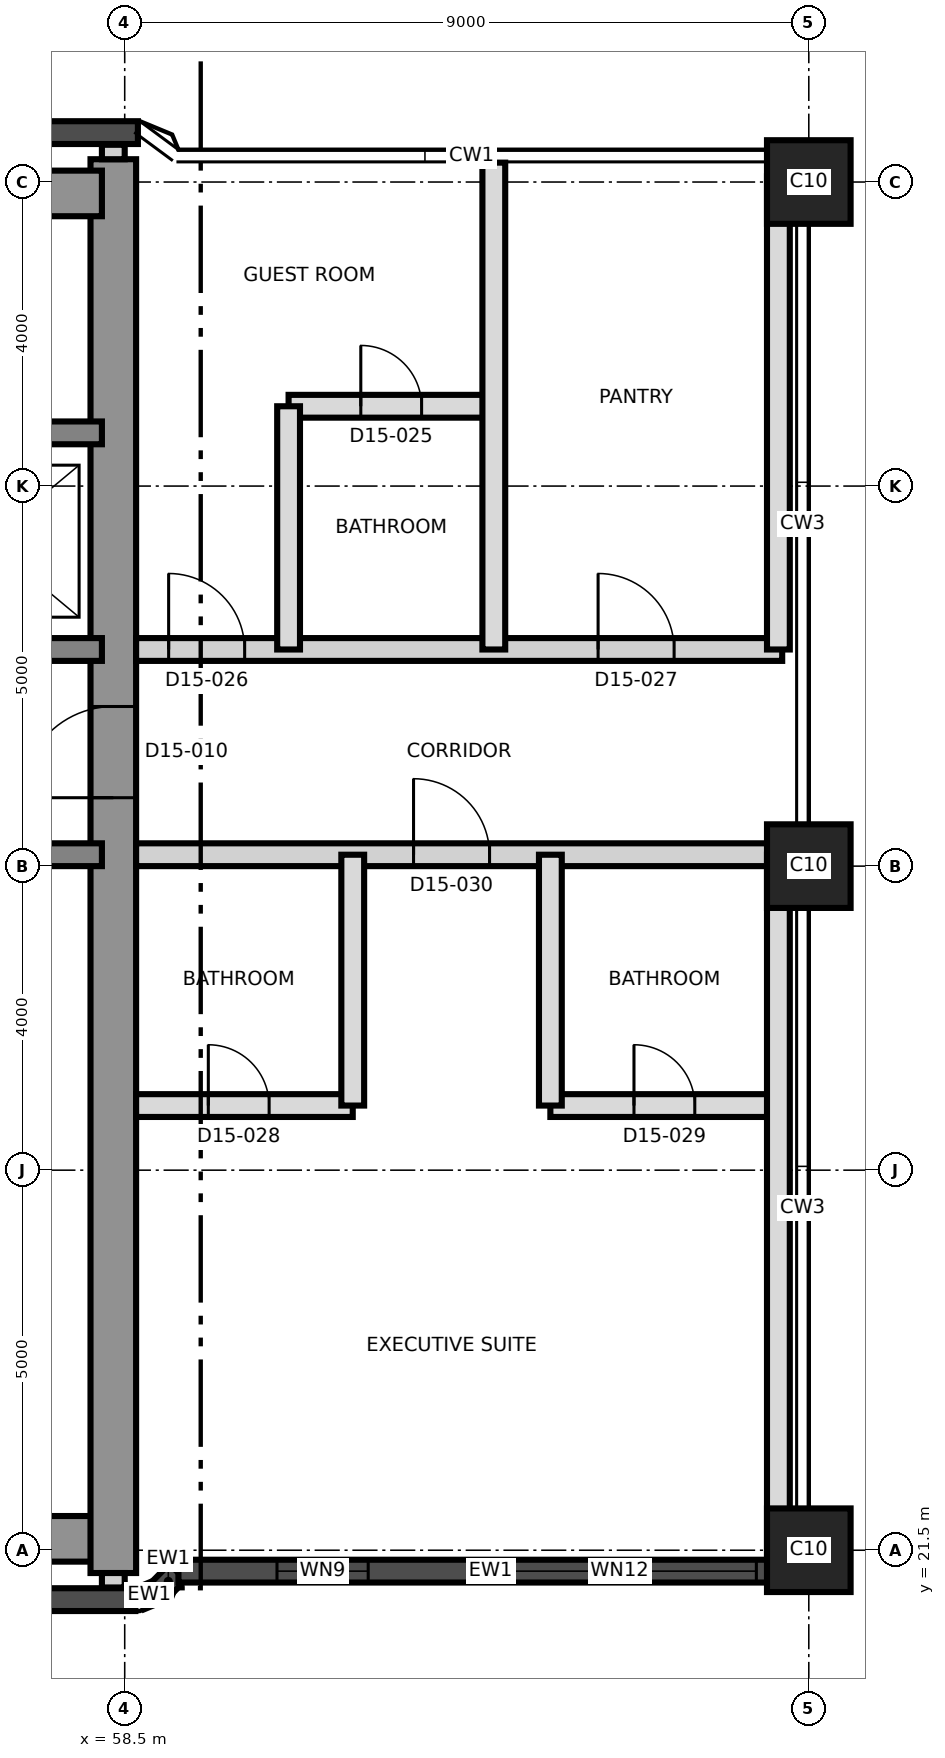
"""IFC4 building model, lengths in metres.
Left out: names, types, materials, properties, quantities, classifications, styles, units other than length and angle.
Written with IfcOpenShell. Run it as: python <this file> out.ifc"""

import sys

from ifc_helpers import new_model, si_unit, direction, frame, frame_2d, origin, origin_2d, place, context, subcontext, project, spatial, rectangle, extrude, element, fill, save


model = new_model("IFC4")
c1 = context("Model", 3, precision=1e-05, world=origin(), true_north=direction((0.0, 1.0)))
c2 = subcontext(c1, "Body", "Model", "MODEL_VIEW")
j1 = project(units=[si_unit("LENGTHUNIT", "METRE"), si_unit("PLANEANGLEUNIT", "RADIAN")], contexts=[c1])
p1 = place(None, origin())
s1 = spatial("IfcSite", under=j1, at=p1, CompositionType="ELEMENT")
p2 = place(p1, origin())
s2 = spatial("IfcBuilding", under=s1, at=p2, CompositionType="ELEMENT")
p3 = place(p2, frame((0.0, 0.0, 153.3)))
s3 = spatial("IfcBuildingStorey", under=s2, at=p3, CompositionType="ELEMENT", Elevation=153.3)
p4 = place(p3, frame((31.2, 21.65, 0.0), z_axis=(0.0, 0.0, 1.0), x_axis=(1.0, 0.0, 0.0)))
e1 = element("IfcWall", 1, at=p4, inside=s3, PredefinedType="SHEAR", context=c2, shape_type="SweptSolid", body=[
    extrude(rectangle(XDim=27.0, YDim=0.6, at=frame_2d((13.5, 0.0))), origin(), (0.0, 0.0, 1.0), 3.7),
])
p5 = place(p3, frame((58.35, 21.2, 0.0), z_axis=(0.0, 0.0, 1.0), x_axis=(0.0, 1.0, 0.0)))
e2 = element("IfcWall", 2, at=p5, inside=s3, PredefinedType="SHEAR", context=c2, shape_type="SweptSolid", body=[
    extrude(rectangle(XDim=18.6, YDim=0.6, at=frame_2d((9.3, 0.0))), origin(), (0.0, 0.0, 1.0), 3.7),
])
p6 = place(p5, frame((10.2, 0.0, 0.0)))
e3 = element("IfcOpeningElement", 3, at=p6, cuts=e2, PredefinedType="OPENING", context=c2, shape_type="SweptSolid", body=[
    extrude(rectangle(XDim=1.2, YDim=2.1, at=frame_2d((0.6, 1.05))), frame((0.0, 0.31, 0.0), z_axis=(0.0, -1.0, 0.0), x_axis=(1.0, 0.0, 0.0)), (0.0, 0.0, 1.0), 0.62),
])
p7 = place(p3, frame((31.2, 39.35, 0.0), z_axis=(0.0, 0.0, 1.0), x_axis=(1.0, 0.0, 0.0)))
e4 = element("IfcWall", 4, at=p7, inside=s3, PredefinedType="SHEAR", context=c2, shape_type="SweptSolid", body=[
    extrude(rectangle(XDim=27.0, YDim=0.6, at=frame_2d((13.5, 0.0))), origin(), (0.0, 0.0, 1.0), 3.7),
])
p8 = place(p7, frame((10.5, 0.0, 0.0)))
e5 = element("IfcOpeningElement", 5, at=p8, cuts=e4, PredefinedType="OPENING", context=c2, shape_type="SweptSolid", body=[
    extrude(rectangle(XDim=1.2, YDim=2.1, at=frame_2d((0.6, 1.05))), frame((0.0, 0.31, 0.0), z_axis=(0.0, -1.0, 0.0), x_axis=(1.0, 0.0, 0.0)), (0.0, 0.0, 1.0), 0.62),
])
p9 = place(p3, frame((31.8, 30.65, 0.0), z_axis=(0.0, 0.0, 1.0), x_axis=(1.0, 0.0, 0.0)))
e6 = element("IfcWall", 6, at=p9, inside=s3, PredefinedType="SHEAR", context=c2, shape_type="SweptSolid", body=[
    extrude(rectangle(XDim=26.4, YDim=0.3, at=frame_2d((13.2, 0.0))), origin(), (0.0, 0.0, 1.0), 3.7),
])
p10 = place(p9, frame((24.7, 0.0, 0.0)))
e7 = element("IfcOpeningElement", 7, at=p10, cuts=e6, PredefinedType="OPENING", context=c2, shape_type="SweptSolid", body=[
    extrude(rectangle(XDim=1.0, YDim=2.1, at=frame_2d((0.5, 1.05))), frame((0.0, 0.16, 0.0), z_axis=(0.0, -1.0, 0.0), x_axis=(1.0, 0.0, 0.0)), (0.0, 0.0, 1.0), 0.32),
])
p11 = place(p3, frame((31.8, 33.35, 0.0), z_axis=(0.0, 0.0, 1.0), x_axis=(1.0, 0.0, 0.0)))
e8 = element("IfcWall", 8, at=p11, inside=s3, PredefinedType="SHEAR", context=c2, shape_type="SweptSolid", body=[
    extrude(rectangle(XDim=26.4, YDim=0.3, at=frame_2d((13.2, 0.0))), origin(), (0.0, 0.0, 1.0), 3.7),
])
p12 = place(p11, frame((13.85, 0.0, 0.0)))
e9 = element("IfcOpeningElement", 9, at=p12, cuts=e8, PredefinedType="OPENING", context=c2, shape_type="SweptSolid", body=[
    extrude(rectangle(XDim=1.4, YDim=2.1, at=frame_2d((0.7, 1.05))), frame((0.0, 0.16, 0.0), z_axis=(0.0, -1.0, 0.0), x_axis=(1.0, 0.0, 0.0)), (0.0, 0.0, 1.0), 0.32),
])
p13 = place(p11, frame((5.325, 0.0, 0.0)))
e10 = element("IfcOpeningElement", 10, at=p13, cuts=e8, PredefinedType="OPENING", context=c2, shape_type="SweptSolid", body=[
    extrude(rectangle(XDim=1.2, YDim=2.1, at=frame_2d((0.6, 1.05))), frame((0.0, 0.16, 0.0), z_axis=(0.0, -1.0, 0.0), x_axis=(1.0, 0.0, 0.0)), (0.0, 0.0, 1.0), 0.32),
])
p14 = place(p11, frame((19.875, 0.0, 0.0)))
e11 = element("IfcOpeningElement", 11, at=p14, cuts=e8, PredefinedType="OPENING", context=c2, shape_type="SweptSolid", body=[
    extrude(rectangle(XDim=1.2, YDim=2.1, at=frame_2d((0.6, 1.05))), frame((0.0, 0.16, 0.0), z_axis=(0.0, -1.0, 0.0), x_axis=(1.0, 0.0, 0.0)), (0.0, 0.0, 1.0), 0.32),
])
p15 = place(p3, frame((43.5, 36.2, 0.0), z_axis=(0.0, 0.0, 1.0), x_axis=(1.0, 0.0, 0.0)))
e12 = element("IfcWall", 12, at=p15, inside=s3, PredefinedType="SHEAR", context=c2, shape_type="SweptSolid", body=[
    extrude(rectangle(XDim=14.7, YDim=0.3, at=frame_2d((7.35, 0.0))), origin(), (0.0, 0.0, 1.0), 3.7),
])
p16 = place(p15, frame((6.9, 0.0, 0.0)))
e13 = element("IfcOpeningElement", 13, at=p16, cuts=e12, PredefinedType="OPENING", context=c2, shape_type="SweptSolid", body=[
    extrude(rectangle(XDim=1.2, YDim=2.1, at=frame_2d((0.6, 1.05))), frame((0.0, 0.16, 0.0), z_axis=(0.0, -1.0, 0.0), x_axis=(1.0, 0.0, 0.0)), (0.0, 0.0, 1.0), 0.32),
])
p17 = place(p15, frame((0.7, 0.0, 0.0)))
e14 = element("IfcOpeningElement", 14, at=p17, cuts=e12, PredefinedType="OPENING", context=c2, shape_type="SweptSolid", body=[
    extrude(rectangle(XDim=1.3, YDim=2.4, at=frame_2d((0.65, 1.2))), frame((0.0, 0.16, 0.0), z_axis=(0.0, -1.0, 0.0), x_axis=(1.0, 0.0, 0.0)), (0.0, 0.0, 1.0), 0.32),
])
p18 = place(p15, frame((3.7, 0.0, 0.0)))
e15 = element("IfcOpeningElement", 15, at=p18, cuts=e12, PredefinedType="OPENING", context=c2, shape_type="SweptSolid", body=[
    extrude(rectangle(XDim=1.3, YDim=2.4, at=frame_2d((0.65, 1.2))), frame((0.0, 0.16, 0.0), z_axis=(0.0, -1.0, 0.0), x_axis=(1.0, 0.0, 0.0)), (0.0, 0.0, 1.0), 0.32),
])
for number, where, z_axis, x_axis in (
    (16, (67.5, 21.5, 0.0), (0.0, 0.0, 1.0), (1.0, 0.0, 0.0)),
    (17, (67.5, 30.5, 0.0), (0.0, 0.0, 1.0), (1.0, 0.0, 0.0)),
    (18, (67.5, 39.5, 0.0), (0.0, 0.0, 1.0), (1.0, 0.0, 0.0)),
):
    element("IfcColumn", number, at=place(p3, frame(where, z_axis=z_axis, x_axis=x_axis)), inside=s3, PredefinedType="COLUMN", context=c2, shape_type="SweptSolid", body=[
        extrude(rectangle(XDim=1.1, YDim=1.1, at=origin_2d()), origin(), (0.0, 0.0, 1.0), 3.7),
    ])
p19 = place(p3, frame((58.674, 40.15, 0.0), z_axis=(0.0, 0.0, 1.0), x_axis=(-1.0, 0.0, 0.0)))
e19 = element("IfcWall", 19, at=p19, inside=s3, PredefinedType="SOLIDWALL", context=c2, shape_type="SweptSolid", body=[
    extrude(rectangle(XDim=5.116, YDim=0.3, at=frame_2d((2.558, 0.0))), origin(), (0.0, 0.0, 1.0), 3.4),
])
p20 = place(p3, frame((31.36, 20.85, 0.0), z_axis=(0.0, 0.0, 1.0), x_axis=(1.0, 0.0, 0.0)))
e20 = element("IfcWall", 20, at=p20, inside=s3, PredefinedType="SOLIDWALL", context=c2, shape_type="SweptSolid", body=[
    extrude(rectangle(XDim=27.281, YDim=0.3, at=frame_2d((13.64, 0.0))), origin(), (0.0, 0.0, 1.0), 3.4),
])
p21 = place(p3, frame((58.698, 20.861, 0.0), z_axis=(0.0, 0.0, 1.0), x_axis=(0.923757413239, 0.38297812142, 0.0)))
e21 = element("IfcWall", 21, at=p21, inside=s3, PredefinedType="SOLIDWALL", context=c2, shape_type="SweptSolid", body=[
    extrude(rectangle(XDim=0.275, YDim=0.3, at=frame_2d((0.138, 0.0))), origin(), (0.0, 0.0, 1.0), 3.4),
])
p22 = place(p3, frame((58.952, 20.967, 0.0), z_axis=(0.0, 0.0, 1.0), x_axis=(0.702144810536, 0.712034174065, 0.0)))
e22 = element("IfcWall", 22, at=p22, inside=s3, PredefinedType="SOLIDWALL", context=c2, shape_type="SweptSolid", body=[
    extrude(rectangle(XDim=0.346, YDim=0.3, at=frame_2d((0.173, 0.0))), origin(), (0.0, 0.0, 1.0), 3.4),
])
p23 = place(p3, frame((59.207, 21.225, 0.0), z_axis=(0.0, 0.0, 1.0), x_axis=(1.0, 0.0, 0.0)))
e23 = element("IfcWall", 23, at=p23, inside=s3, PredefinedType="SOLIDWALL", context=c2, shape_type="SweptSolid", body=[
    extrude(rectangle(XDim=8.213, YDim=0.3, at=frame_2d((4.106, 0.0))), origin(), (0.0, 0.0, 1.0), 3.4),
])
p24 = place(p23, frame((1.297, 0.0, 0.9)))
e24 = element("IfcOpeningElement", 24, at=p24, cuts=e23, PredefinedType="OPENING", context=c2, shape_type="SweptSolid", body=[
    extrude(rectangle(XDim=1.2, YDim=1.5, at=frame_2d((0.6, 0.75))), frame((0.0, 0.16, 0.0), z_axis=(0.0, -1.0, 0.0), x_axis=(1.0, 0.0, 0.0)), (0.0, 0.0, 1.0), 0.32),
])
p25 = place(p23, frame((4.003, 0.0, 0.9)))
e25 = element("IfcOpeningElement", 25, at=p25, cuts=e23, PredefinedType="OPENING", context=c2, shape_type="SweptSolid", body=[
    extrude(rectangle(XDim=3.6, YDim=1.5, at=frame_2d((1.8, 0.75))), frame((0.0, 0.16, 0.0), z_axis=(0.0, -1.0, 0.0), x_axis=(1.0, 0.0, 0.0)), (0.0, 0.0, 1.0), 0.32),
])
p26 = place(p3, frame((58.65, 27.35, 0.0), z_axis=(0.0, 0.0, 1.0), x_axis=(1.0, 0.0, 0.0)))
e26 = element("IfcWall", 26, at=p26, inside=s3, PredefinedType="PARTITIONING", context=c2, shape_type="SweptSolid", body=[
    extrude(rectangle(XDim=2.85, YDim=0.3, at=frame_2d((1.425, 0.0))), origin(), (0.0, 0.0, 1.0), 3.4),
])
p27 = place(p26, frame((0.95, 0.0, 0.0)))
e27 = element("IfcOpeningElement", 27, at=p27, cuts=e26, PredefinedType="OPENING", context=c2, shape_type="SweptSolid", body=[
    extrude(rectangle(XDim=0.8, YDim=2.1, at=frame_2d((0.4, 1.05))), frame((0.0, 0.16, 0.0), z_axis=(0.0, -1.0, 0.0), x_axis=(1.0, 0.0, 0.0)), (0.0, 0.0, 1.0), 0.32),
])
p28 = place(p3, frame((64.1, 27.35, 0.0), z_axis=(0.0, 0.0, 1.0), x_axis=(1.0, 0.0, 0.0)))
e28 = element("IfcWall", 28, at=p28, inside=s3, PredefinedType="PARTITIONING", context=c2, shape_type="SweptSolid", body=[
    extrude(rectangle(XDim=3.0, YDim=0.3, at=frame_2d((1.5, 0.0))), origin(), (0.0, 0.0, 1.0), 3.4),
])
p29 = place(p28, frame((1.1, 0.0, 0.0)))
e29 = element("IfcOpeningElement", 29, at=p29, cuts=e28, PredefinedType="OPENING", context=c2, shape_type="SweptSolid", body=[
    extrude(rectangle(XDim=0.8, YDim=2.1, at=frame_2d((0.4, 1.05))), frame((0.0, 0.16, 0.0), z_axis=(0.0, -1.0, 0.0), x_axis=(1.0, 0.0, 0.0)), (0.0, 0.0, 1.0), 0.32),
])
p30 = place(p3, frame((58.65, 30.65, 0.0), z_axis=(0.0, 0.0, 1.0), x_axis=(1.0, 0.0, 0.0)))
e30 = element("IfcWall", 30, at=p30, inside=s3, PredefinedType="PARTITIONING", context=c2, shape_type="SweptSolid", body=[
    extrude(rectangle(XDim=8.5, YDim=0.3, at=frame_2d((4.25, 0.0))), origin(), (0.0, 0.0, 1.0), 3.4),
])
p31 = place(p30, frame((3.65, 0.0, 0.0)))
e31 = element("IfcOpeningElement", 31, at=p31, cuts=e30, PredefinedType="OPENING", context=c2, shape_type="SweptSolid", body=[
    extrude(rectangle(XDim=1.0, YDim=2.4, at=frame_2d((0.5, 1.2))), frame((0.0, 0.16, 0.0), z_axis=(0.0, -1.0, 0.0), x_axis=(1.0, 0.0, 0.0)), (0.0, 0.0, 1.0), 0.32),
])
p32 = place(p3, frame((58.65, 33.35, 0.0), z_axis=(0.0, 0.0, 1.0), x_axis=(1.0, 0.0, 0.0)))
e32 = element("IfcWall", 32, at=p32, inside=s3, PredefinedType="PARTITIONING", context=c2, shape_type="SweptSolid", body=[
    extrude(rectangle(XDim=8.5, YDim=0.3, at=frame_2d((4.25, 0.0))), origin(), (0.0, 0.0, 1.0), 3.4),
])
p33 = place(p32, frame((0.428, 0.0, 0.0)))
e33 = element("IfcOpeningElement", 33, at=p33, cuts=e32, PredefinedType="OPENING", context=c2, shape_type="SweptSolid", body=[
    extrude(rectangle(XDim=1.0, YDim=2.1, at=frame_2d((0.5, 1.05))), frame((0.0, 0.16, 0.0), z_axis=(0.0, -1.0, 0.0), x_axis=(1.0, 0.0, 0.0)), (0.0, 0.0, 1.0), 0.32),
])
p34 = place(p32, frame((6.078, 0.0, 0.0)))
e34 = element("IfcOpeningElement", 34, at=p34, cuts=e32, PredefinedType="OPENING", context=c2, shape_type="SweptSolid", body=[
    extrude(rectangle(XDim=1.0, YDim=2.1, at=frame_2d((0.5, 1.05))), frame((0.0, 0.16, 0.0), z_axis=(0.0, -1.0, 0.0), x_axis=(1.0, 0.0, 0.0)), (0.0, 0.0, 1.0), 0.32),
])
p35 = place(p3, frame((60.656, 36.55, 0.0), z_axis=(0.0, 0.0, 1.0), x_axis=(1.0, 0.0, 0.0)))
e35 = element("IfcWall", 35, at=p35, inside=s3, PredefinedType="PARTITIONING", context=c2, shape_type="SweptSolid", body=[
    extrude(rectangle(XDim=2.7, YDim=0.3, at=frame_2d((1.35, 0.0))), origin(), (0.0, 0.0, 1.0), 3.4),
])
p36 = place(p35, frame((0.95, 0.0, 0.0)))
e36 = element("IfcOpeningElement", 36, at=p36, cuts=e35, PredefinedType="OPENING", context=c2, shape_type="SweptSolid", body=[
    extrude(rectangle(XDim=0.8, YDim=2.1, at=frame_2d((0.4, 1.05))), frame((0.0, 0.16, 0.0), z_axis=(0.0, -1.0, 0.0), x_axis=(1.0, 0.0, 0.0)), (0.0, 0.0, 1.0), 0.32),
])
p37 = place(p3, frame((60.656, 33.35, 0.0), z_axis=(0.0, 0.0, 1.0), x_axis=(0.0, 1.0, 0.0)))
e37 = element("IfcWall", 37, at=p37, inside=s3, PredefinedType="PARTITIONING", context=c2, shape_type="SweptSolid", body=[
    extrude(rectangle(XDim=3.2, YDim=0.3, at=frame_2d((1.6, 0.0))), origin(), (0.0, 0.0, 1.0), 3.4),
])
p38 = place(p3, frame((61.5, 27.35, 0.0), z_axis=(0.0, 0.0, 1.0), x_axis=(0.0, 1.0, 0.0)))
e38 = element("IfcWall", 38, at=p38, inside=s3, PredefinedType="PARTITIONING", context=c2, shape_type="SweptSolid", body=[
    extrude(rectangle(XDim=3.3, YDim=0.3, at=frame_2d((1.65, 0.0))), origin(), (0.0, 0.0, 1.0), 3.4),
])
p39 = place(p3, frame((63.356, 33.35, 0.0), z_axis=(0.0, 0.0, 1.0), x_axis=(0.0, 1.0, 0.0)))
e39 = element("IfcWall", 39, at=p39, inside=s3, PredefinedType="PARTITIONING", context=c2, shape_type="SweptSolid", body=[
    extrude(rectangle(XDim=6.405, YDim=0.3, at=frame_2d((3.202, 0.0))), origin(), (0.0, 0.0, 1.0), 3.4),
])
p40 = place(p3, frame((64.1, 27.35, 0.0), z_axis=(0.0, 0.0, 1.0), x_axis=(0.0, 1.0, 0.0)))
e40 = element("IfcWall", 40, at=p40, inside=s3, PredefinedType="PARTITIONING", context=c2, shape_type="SweptSolid", body=[
    extrude(rectangle(XDim=3.3, YDim=0.3, at=frame_2d((1.65, 0.0))), origin(), (0.0, 0.0, 1.0), 3.4),
])
p41 = place(p3, frame((67.1, 21.425, 0.0), z_axis=(0.0, 0.0, 1.0), x_axis=(0.0, 1.0, 0.0)))
e41 = element("IfcWall", 41, at=p41, inside=s3, PredefinedType="PARTITIONING", context=c2, shape_type="SweptSolid", body=[
    extrude(rectangle(XDim=9.225, YDim=0.3, at=frame_2d((4.612, 0.0))), origin(), (0.0, 0.0, 1.0), 3.4),
])
p42 = place(p3, frame((67.1, 33.35, 0.0), z_axis=(0.0, 0.0, 1.0), x_axis=(0.0, 1.0, 0.0)))
e42 = element("IfcWall", 42, at=p42, inside=s3, PredefinedType="PARTITIONING", context=c2, shape_type="SweptSolid", body=[
    extrude(rectangle(XDim=6.225, YDim=0.3, at=frame_2d((3.112, 0.0))), origin(), (0.0, 0.0, 1.0), 3.4),
])
for number, where, z_axis, x_axis in (
    (43, (58.35, 21.2, 0.0), (0.0, 0.0, 1.0), (0.0, -1.0, 0.0)),
    (44, (58.35, 39.8, 0.0), (0.0, 0.0, 1.0), (0.0, 1.0, 0.0)),
):
    element("IfcWall", number, at=place(p3, frame(where, z_axis=z_axis, x_axis=x_axis)), inside=s3, PredefinedType="PARTITIONING", context=c2, shape_type="SweptSolid", body=[
        extrude(rectangle(XDim=0.19, YDim=0.3, at=frame_2d((0.095, 0.0))), origin(), (0.0, 0.0, 1.0), 3.4),
    ])
p43 = place(p24, origin())
e45 = element("IfcWindow", 45, at=p43, inside=s3, PartitioningType="SINGLE_PANEL", PredefinedType="WINDOW", context=c2, shape_type="SweptSolid", body=[
    extrude(rectangle(XDim=1.2, YDim=1.5, at=frame_2d((0.6, 0.75))), frame((0.0, 0.03, 0.0), z_axis=(0.0, -1.0, 0.0), x_axis=(1.0, 0.0, 0.0)), (0.0, 0.0, 1.0), 0.06),
])
fill(e24, e45)
p44 = place(p25, origin())
e46 = element("IfcWindow", 46, at=p44, inside=s3, PartitioningType="SINGLE_PANEL", PredefinedType="WINDOW", context=c2, shape_type="SweptSolid", body=[
    extrude(rectangle(XDim=3.6, YDim=1.5, at=frame_2d((1.8, 0.75))), frame((0.0, 0.03, 0.0), z_axis=(0.0, -1.0, 0.0), x_axis=(1.0, 0.0, 0.0)), (0.0, 0.0, 1.0), 0.06),
])
fill(e25, e46)
p45 = place(p6, origin())
e47 = element("IfcDoor", 47, at=p45, inside=s3, OperationType="SINGLE_SWING_LEFT", PredefinedType="DOOR", context=c2, shape_type="SweptSolid", body=[
    extrude(rectangle(XDim=1.2, YDim=2.1, at=frame_2d((0.6, 1.05))), frame((0.0, 0.025, 0.0), z_axis=(0.0, -1.0, 0.0), x_axis=(1.0, 0.0, 0.0)), (0.0, 0.0, 1.0), 0.05),
])
fill(e3, e47)
p46 = place(p36, origin())
e48 = element("IfcDoor", 48, at=p46, inside=s3, OperationType="SINGLE_SWING_LEFT", PredefinedType="DOOR", context=c2, shape_type="SweptSolid", body=[
    extrude(rectangle(XDim=0.8, YDim=2.1, at=frame_2d((0.4, 1.05))), frame((0.0, 0.025, 0.0), z_axis=(0.0, -1.0, 0.0), x_axis=(1.0, 0.0, 0.0)), (0.0, 0.0, 1.0), 0.05),
])
fill(e36, e48)
p47 = place(p33, origin())
e49 = element("IfcDoor", 49, at=p47, inside=s3, OperationType="SINGLE_SWING_LEFT", PredefinedType="DOOR", context=c2, shape_type="SweptSolid", body=[
    extrude(rectangle(XDim=1.0, YDim=2.1, at=frame_2d((0.5, 1.05))), frame((0.0, 0.025, 0.0), z_axis=(0.0, -1.0, 0.0), x_axis=(1.0, 0.0, 0.0)), (0.0, 0.0, 1.0), 0.05),
])
fill(e33, e49)
p48 = place(p34, origin())
e50 = element("IfcDoor", 50, at=p48, inside=s3, OperationType="SINGLE_SWING_RIGHT", PredefinedType="DOOR", context=c2, shape_type="SweptSolid", body=[
    extrude(rectangle(XDim=1.0, YDim=2.1, at=frame_2d((0.5, 1.05))), frame((0.0, 0.025, 0.0), z_axis=(0.0, -1.0, 0.0), x_axis=(1.0, 0.0, 0.0)), (0.0, 0.0, 1.0), 0.05),
])
fill(e34, e50)
p49 = place(p27, origin())
e51 = element("IfcDoor", 51, at=p49, inside=s3, OperationType="SINGLE_SWING_LEFT", PredefinedType="DOOR", context=c2, shape_type="SweptSolid", body=[
    extrude(rectangle(XDim=0.8, YDim=2.1, at=frame_2d((0.4, 1.05))), frame((0.0, 0.025, 0.0), z_axis=(0.0, -1.0, 0.0), x_axis=(1.0, 0.0, 0.0)), (0.0, 0.0, 1.0), 0.05),
])
fill(e27, e51)
p50 = place(p29, origin())
e52 = element("IfcDoor", 52, at=p50, inside=s3, OperationType="SINGLE_SWING_RIGHT", PredefinedType="DOOR", context=c2, shape_type="SweptSolid", body=[
    extrude(rectangle(XDim=0.8, YDim=2.1, at=frame_2d((0.4, 1.05))), frame((0.0, 0.025, 0.0), z_axis=(0.0, -1.0, 0.0), x_axis=(1.0, 0.0, 0.0)), (0.0, 0.0, 1.0), 0.05),
])
fill(e29, e52)
p51 = place(p31, origin())
e53 = element("IfcDoor", 53, at=p51, inside=s3, OperationType="SINGLE_SWING_LEFT", PredefinedType="DOOR", context=c2, shape_type="SweptSolid", body=[
    extrude(rectangle(XDim=1.0, YDim=2.4, at=frame_2d((0.5, 1.2))), frame((0.0, 0.025, 0.0), z_axis=(0.0, -1.0, 0.0), x_axis=(1.0, 0.0, 0.0)), (0.0, 0.0, 1.0), 0.05),
])
fill(e31, e53)
save(model, sys.argv[1])
